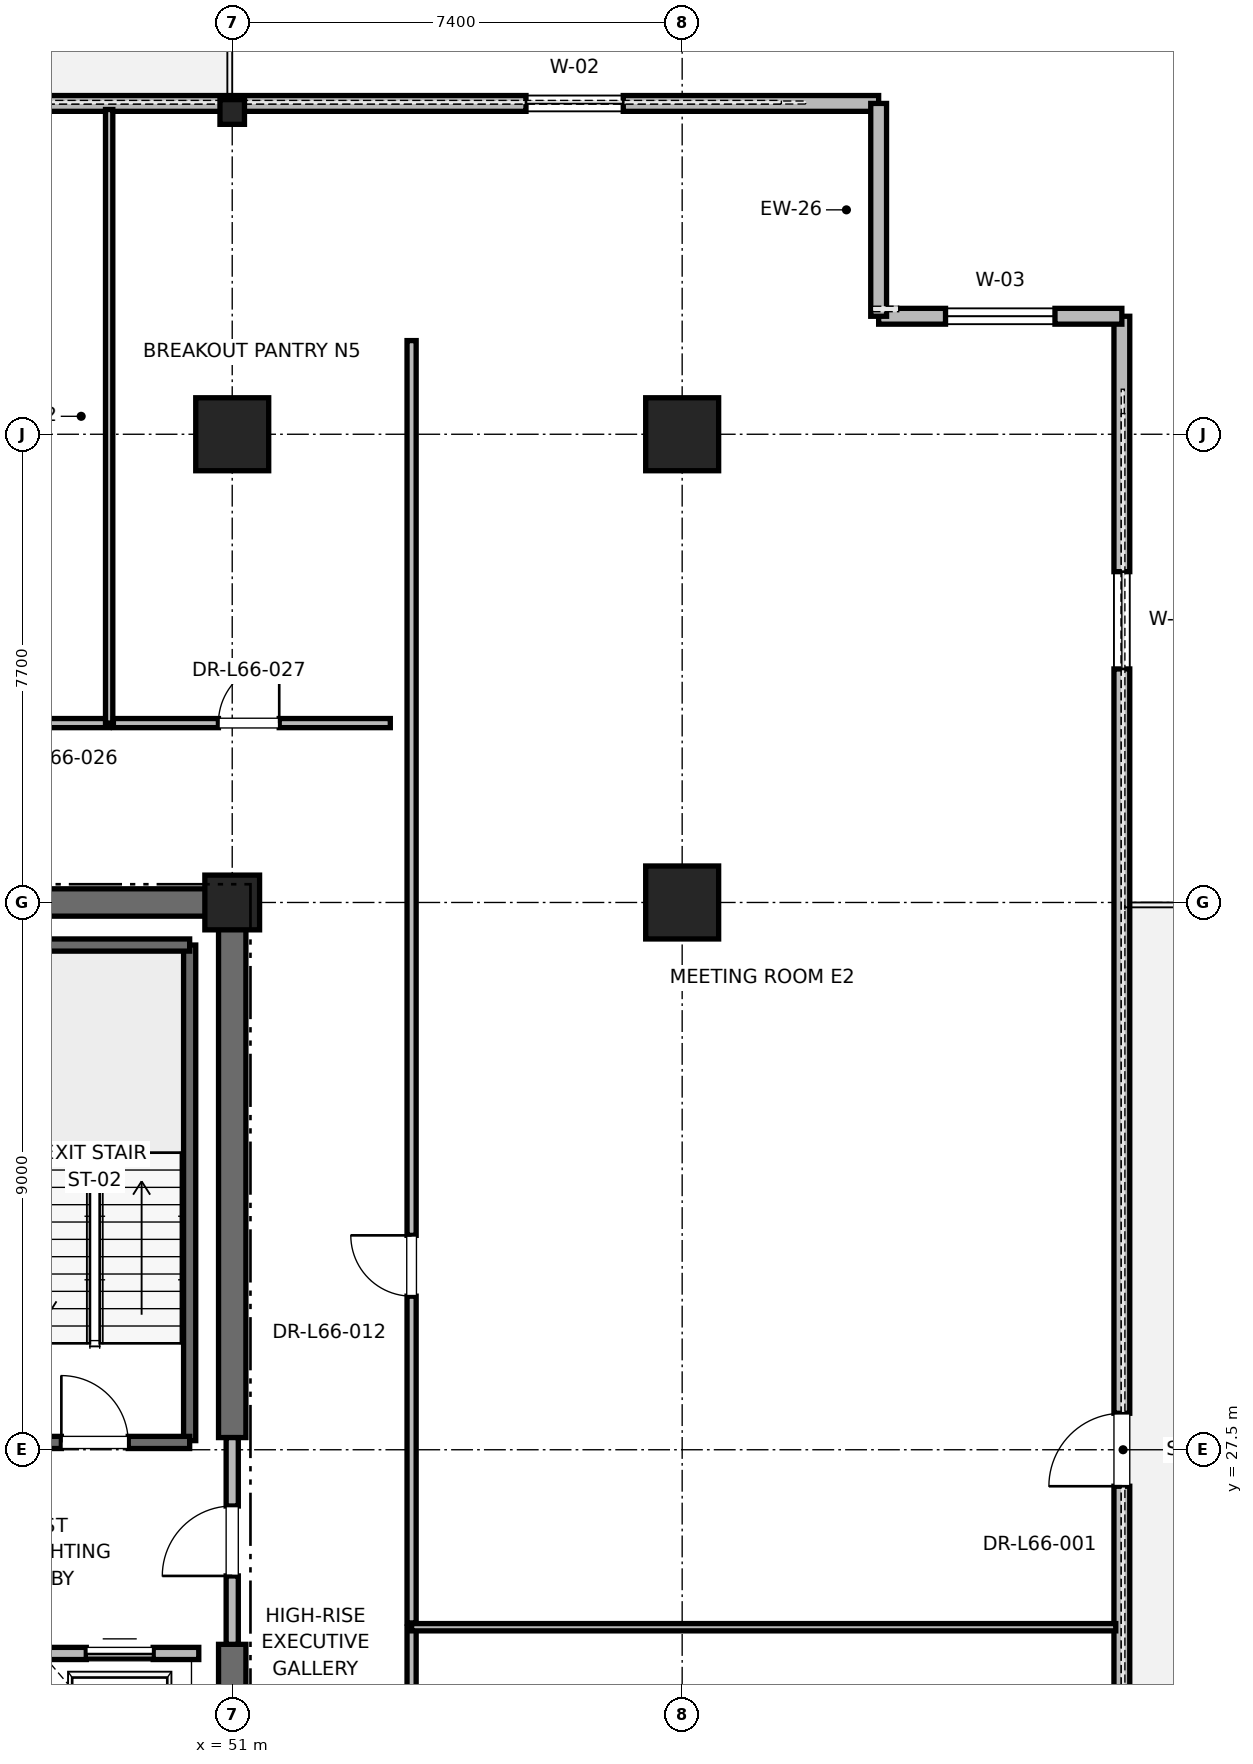
"""IFC4 building model, lengths in metres.
Left out: names, types, materials, properties, quantities, classifications, styles, units other than length and angle.
Written with IfcOpenShell. Run it as: python <this file> out.ifc"""

import sys

from ifc_helpers import new_model, si_unit, direction, frame, frame_2d, origin, origin_2d, place, context, subcontext, project, spatial, rectangle, i_section, extrude, element, fill, save


model = new_model("IFC4")
c1 = context("Model", 3, precision=1e-05, world=origin(), true_north=direction((0.0, 1.0)))
c2 = subcontext(c1, "Body", "Model", "MODEL_VIEW")
j1 = project(units=[si_unit("LENGTHUNIT", "METRE"), si_unit("PLANEANGLEUNIT", "RADIAN")], contexts=[c1])
p1 = place(None, origin())
s1 = spatial("IfcSite", under=j1, at=p1, CompositionType="ELEMENT")
p2 = place(p1, origin())
s2 = spatial("IfcBuilding", under=s1, at=p2, CompositionType="ELEMENT")
p3 = place(p2, frame((0.0, 0.0, 283.2)))
s3 = spatial("IfcBuildingStorey", under=s2, at=p3, CompositionType="ELEMENT", Elevation=283.2)
for number, where, z_axis, x_axis in (
    (1, (51.0, 44.2, 0.0), (0.0, 0.0, 1.0), (1.0, 0.0, 0.0)),
    (2, (58.4, 36.5, 0.0), (0.0, 0.0, 1.0), (1.0, 0.0, 0.0)),
    (3, (58.4, 44.2, 0.0), (0.0, 0.0, 1.0), (1.0, 0.0, 0.0)),
):
    element("IfcColumn", number, at=place(p3, frame(where, z_axis=z_axis, x_axis=x_axis)), inside=s3, PredefinedType="COLUMN", context=c2, shape_type="SweptSolid", body=[
        extrude(rectangle(XDim=1.2, YDim=1.2, at=origin_2d()), origin(), (0.0, 0.0, 1.0), 4.0),
    ])
p4 = place(p3, frame((51.0, 49.5, 0.0), z_axis=(0.0, 0.0, 1.0), x_axis=(1.0, 0.0, 0.0)))
e4 = element("IfcColumn", 4, at=p4, inside=s3, PredefinedType="COLUMN", context=c2, shape_type="SweptSolid", body=[
    extrude(i_section(OverallWidth=0.403, OverallDepth=0.406, WebThickness=0.027, FlangeThickness=0.043, FilletRadius=0.015, at=origin_2d()), origin(), (0.0, 0.0, 1.0), 4.0),
])
p5 = place(p3, frame((51.0, 36.5, 0.0), z_axis=(0.0, 0.0, 1.0), x_axis=(1.0, 0.0, 0.0)))
e5 = element("IfcColumn", 5, at=p5, inside=s3, PredefinedType="PILASTER", context=c2, shape_type="SweptSolid", body=[
    extrude(rectangle(XDim=0.9, YDim=0.9, at=origin_2d()), origin(), (0.0, 0.0, 1.0), 4.0),
])
for number, where, z_axis, x_axis in (
    (6, (45.2, 36.5, 0.0), (0.0, 0.0, 1.0), (1.0, 0.0, 0.0)),
    (7, (51.0, 18.5, 0.0), (0.0, 0.0, 1.0), (0.0, 1.0, 0.0)),
):
    element("IfcWall", number, at=place(p3, frame(where, z_axis=z_axis, x_axis=x_axis)), inside=s3, PredefinedType="SHEAR", context=c2, shape_type="SweptSolid", body=[
        extrude(rectangle(XDim=5.8, YDim=0.45, at=frame_2d((2.9, 0.0))), origin(), (0.0, 0.0, 1.0), 3.785),
    ])
p6 = place(p3, frame((51.0, 27.7, 0.0), z_axis=(0.0, 0.0, 1.0), x_axis=(0.0, 1.0, 0.0)))
e8 = element("IfcWall", 8, at=p6, inside=s3, PredefinedType="SHEAR", context=c2, shape_type="SweptSolid", body=[
    extrude(rectangle(XDim=8.8, YDim=0.45, at=frame_2d((4.4, 0.0))), origin(), (0.0, 0.0, 1.0), 3.785),
])
p7 = place(p3, frame((65.631, 8.86, 0.0), z_axis=(0.0, 0.0, 1.0), x_axis=(0.0, 1.0, 0.0)))
e9 = element("IfcWall", 9, at=p7, inside=s3, PredefinedType="PARAPET", context=c2, shape_type="SweptSolid", body=[
    extrude(rectangle(XDim=37.281, YDim=0.26, at=frame_2d((18.64, 0.0))), origin(), (0.0, 0.0, 1.0), 3.123),
])
p8 = place(p7, frame((4.2, 0.0, 0.85)))
e10 = element("IfcOpeningElement", 10, at=p8, cuts=e9, PredefinedType="OPENING", context=c2, shape_type="SweptSolid", body=[
    extrude(rectangle(XDim=1.6, YDim=2.1, at=frame_2d((0.8, 1.05))), frame((0.0, 0.13, 0.0), z_axis=(0.0, -1.0, 0.0), x_axis=(1.0, 0.0, 0.0)), (0.0, 0.0, 1.0), 0.26),
])
p9 = place(p7, frame((18.04, 0.0, 0.0)))
e11 = element("IfcOpeningElement", 11, at=p9, cuts=e9, PredefinedType="OPENING", context=c2, shape_type="SweptSolid", body=[
    extrude(rectangle(XDim=1.2, YDim=2.2, at=frame_2d((0.6, 1.1))), frame((0.0, 0.13, 0.0), z_axis=(0.0, -1.0, 0.0), x_axis=(1.0, 0.0, 0.0)), (0.0, 0.0, 1.0), 0.26),
])
p10 = place(p7, frame((31.481, 0.0, 0.85)))
e12 = element("IfcOpeningElement", 12, at=p10, cuts=e9, PredefinedType="OPENING", context=c2, shape_type="SweptSolid", body=[
    extrude(rectangle(XDim=1.6, YDim=2.1, at=frame_2d((0.8, 1.05))), frame((0.0, 0.13, 0.0), z_axis=(0.0, -1.0, 0.0), x_axis=(1.0, 0.0, 0.0)), (0.0, 0.0, 1.0), 0.26),
])
p11 = place(p3, frame((61.631, 49.64, 0.0), z_axis=(0.0, 0.0, 1.0), x_axis=(-1.0, 0.0, 0.0)))
e13 = element("IfcWall", 13, at=p11, inside=s3, PredefinedType="PARAPET", context=c2, shape_type="SweptSolid", body=[
    extrude(rectangle(XDim=43.263, YDim=0.26, at=frame_2d((21.631, 0.0))), origin(), (0.0, 0.0, 1.0), 3.123),
])
p12 = place(p11, frame((4.2, 0.0, 0.85)))
e14 = element("IfcOpeningElement", 14, at=p12, cuts=e13, PredefinedType="OPENING", context=c2, shape_type="SweptSolid", body=[
    extrude(rectangle(XDim=1.6, YDim=2.1, at=frame_2d((0.8, 1.05))), frame((0.0, 0.13, 0.0), z_axis=(0.0, -1.0, 0.0), x_axis=(1.0, 0.0, 0.0)), (0.0, 0.0, 1.0), 0.26),
])
p13 = place(p11, frame((21.031, 0.0, 0.0)))
e15 = element("IfcOpeningElement", 15, at=p13, cuts=e13, PredefinedType="OPENING", context=c2, shape_type="SweptSolid", body=[
    extrude(rectangle(XDim=1.2, YDim=2.2, at=frame_2d((0.6, 1.1))), frame((0.0, 0.13, 0.0), z_axis=(0.0, -1.0, 0.0), x_axis=(1.0, 0.0, 0.0)), (0.0, 0.0, 1.0), 0.26),
])
p14 = place(p11, frame((37.463, 0.0, 0.85)))
e16 = element("IfcOpeningElement", 16, at=p14, cuts=e13, PredefinedType="OPENING", context=c2, shape_type="SweptSolid", body=[
    extrude(rectangle(XDim=1.6, YDim=2.1, at=frame_2d((0.8, 1.05))), frame((0.0, 0.13, 0.0), z_axis=(0.0, -1.0, 0.0), x_axis=(1.0, 0.0, 0.0)), (0.0, 0.0, 1.0), 0.26),
])
p15 = place(p3, frame((65.631, 46.14, 0.0), z_axis=(0.0, 0.0, 1.0), x_axis=(-1.0, 0.0, 0.0)))
e17 = element("IfcWall", 17, at=p15, inside=s3, PredefinedType="PARAPET", context=c2, shape_type="SweptSolid", body=[
    extrude(rectangle(XDim=4.0, YDim=0.26, at=frame_2d((2.0, 0.0))), origin(), (0.0, 0.0, 1.0), 3.785),
])
p16 = place(p15, frame((1.1, 0.0, 0.85)))
e18 = element("IfcOpeningElement", 18, at=p16, cuts=e17, PredefinedType="OPENING", context=c2, shape_type="SweptSolid", body=[
    extrude(rectangle(XDim=1.8, YDim=2.2, at=frame_2d((0.9, 1.1))), frame((0.0, 0.13, 0.0), z_axis=(0.0, -1.0, 0.0), x_axis=(1.0, 0.0, 0.0)), (0.0, 0.0, 1.0), 0.26),
])
p17 = place(p3, frame((61.631, 46.14, 0.0), z_axis=(0.0, 0.0, 1.0), x_axis=(0.0, 1.0, 0.0)))
e19 = element("IfcWall", 19, at=p17, inside=s3, PredefinedType="PARAPET", context=c2, shape_type="SweptSolid", body=[
    extrude(rectangle(XDim=3.5, YDim=0.26, at=frame_2d((1.75, 0.0))), origin(), (0.0, 0.0, 1.0), 3.785),
])
p18 = place(p3, frame((50.3, 27.65, 0.0), z_axis=(0.0, 0.0, 1.0), x_axis=(0.0, 1.0, 0.0)))
e20 = element("IfcWall", 20, at=p18, inside=s3, PredefinedType="SOLIDWALL", context=c2, shape_type="SweptSolid", body=[
    extrude(rectangle(XDim=8.15, YDim=0.2, at=frame_2d((4.075, 0.0))), origin(), (0.0, 0.0, 1.0), 3.785),
])
p19 = place(p3, frame((47.18, 35.8, 0.0), z_axis=(0.0, 0.0, 1.0), x_axis=(1.0, 0.0, 0.0)))
e21 = element("IfcWall", 21, at=p19, inside=s3, PredefinedType="SOLIDWALL", context=c2, shape_type="SweptSolid", body=[
    extrude(rectangle(XDim=3.12, YDim=0.2, at=frame_2d((1.56, 0.0))), origin(), (0.0, 0.0, 1.0), 3.785),
])
p20 = place(p3, frame((47.18, 27.62, 0.0), z_axis=(0.0, 0.0, 1.0), x_axis=(1.0, 0.0, 0.0)))
e22 = element("IfcWall", 22, at=p20, inside=s3, PredefinedType="SOLIDWALL", context=c2, shape_type="SweptSolid", body=[
    extrude(rectangle(XDim=3.12, YDim=0.2, at=frame_2d((1.56, 0.0))), origin(), (0.0, 0.0, 1.0), 3.785),
])
p21 = place(p20, frame((1.01, 0.0, 0.0)))
e23 = element("IfcOpeningElement", 23, at=p21, cuts=e22, PredefinedType="OPENING", context=c2, shape_type="SweptSolid", body=[
    extrude(rectangle(XDim=1.1, YDim=2.15, at=frame_2d((0.55, 1.075))), frame((0.0, 0.1, 0.0), z_axis=(0.0, -1.0, 0.0), x_axis=(1.0, 0.0, 0.0)), (0.0, 0.0, 1.0), 0.2),
])
p22 = place(p3, frame((51.0, 24.3, 0.0), z_axis=(0.0, 0.0, 1.0), x_axis=(0.0, 1.0, 0.0)))
e24 = element("IfcWall", 24, at=p22, inside=s3, PredefinedType="PARTITIONING", context=c2, shape_type="SweptSolid", body=[
    extrude(rectangle(XDim=3.4, YDim=0.2, at=frame_2d((1.7, 0.0))), origin(), (0.0, 0.0, 1.0), 2.865),
])
p23 = place(p22, frame((1.125, 0.0, 0.0)))
e25 = element("IfcOpeningElement", 25, at=p23, cuts=e24, PredefinedType="OPENING", context=c2, shape_type="SweptSolid", body=[
    extrude(rectangle(XDim=1.15, YDim=2.2, at=frame_2d((0.575, 1.1))), frame((0.0, 0.1, 0.0), z_axis=(0.0, -1.0, 0.0), x_axis=(1.0, 0.0, 0.0)), (0.0, 0.0, 1.0), 0.2),
])
p24 = place(p3, frame((50.45, 24.15, 0.0), z_axis=(0.0, 0.0, 1.0), x_axis=(-1.0, 0.0, 0.0)))
e26 = element("IfcWall", 26, at=p24, inside=s3, PredefinedType="SOLIDWALL", context=c2, shape_type="SweptSolid", body=[
    extrude(rectangle(XDim=2.6, YDim=0.2, at=frame_2d((1.3, 0.0))), origin(), (0.0, 0.0, 1.0), 2.865),
])
p25 = place(p24, frame((0.75, 0.0, 0.0)))
e27 = element("IfcOpeningElement", 27, at=p25, cuts=e26, PredefinedType="OPENING", context=c2, shape_type="SweptSolid", body=[
    extrude(rectangle(XDim=1.1, YDim=2.2, at=frame_2d((0.55, 1.1))), frame((0.0, 0.1, 0.0), z_axis=(0.0, -1.0, 0.0), x_axis=(1.0, 0.0, 0.0)), (0.0, 0.0, 1.0), 0.2),
])
p26 = place(p3, frame((43.334, 39.45, 0.0), z_axis=(0.0, 0.0, 1.0), x_axis=(1.0, 0.0, 0.0)))
e28 = element("IfcWall", 28, at=p26, inside=s3, PredefinedType="PARTITIONING", context=c2, shape_type="SweptSolid", body=[
    extrude(rectangle(XDim=5.642, YDim=0.15, at=frame_2d((2.821, 0.0))), origin(), (0.0, 0.0, 1.0), 2.85),
])
p27 = place(p26, frame((2.286, 0.0, 0.0)))
e29 = element("IfcOpeningElement", 29, at=p27, cuts=e28, PredefinedType="OPENING", context=c2, shape_type="SweptSolid", body=[
    extrude(rectangle(XDim=1.0, YDim=2.15, at=frame_2d((0.5, 1.075))), frame((0.0, 0.075, 0.0), z_axis=(0.0, -1.0, 0.0), x_axis=(1.0, 0.0, 0.0)), (0.0, 0.0, 1.0), 0.15),
])
p28 = place(p3, frame((48.976, 39.45, 0.0), z_axis=(0.0, 0.0, 1.0), x_axis=(0.0, 1.0, 0.0)))
e30 = element("IfcWall", 30, at=p28, inside=s3, PredefinedType="PARTITIONING", context=c2, shape_type="SweptSolid", body=[
    extrude(rectangle(XDim=10.09, YDim=0.12, at=frame_2d((5.045, 0.0))), origin(), (0.0, 0.0, 1.0), 2.415),
])
p29 = place(p3, frame((49.046, 39.45, 0.0), z_axis=(0.0, 0.0, 1.0), x_axis=(1.0, 0.0, 0.0)))
e31 = element("IfcWall", 31, at=p29, inside=s3, PredefinedType="PARTITIONING", context=c2, shape_type="SweptSolid", body=[
    extrude(rectangle(XDim=4.554, YDim=0.15, at=frame_2d((2.277, 0.0))), origin(), (0.0, 0.0, 1.0), 2.85),
])
p30 = place(p29, frame((1.727, 0.0, 0.0)))
e32 = element("IfcOpeningElement", 32, at=p30, cuts=e31, PredefinedType="OPENING", context=c2, shape_type="SweptSolid", body=[
    extrude(rectangle(XDim=1.0, YDim=2.15, at=frame_2d((0.5, 1.075))), frame((0.0, 0.075, 0.0), z_axis=(0.0, -1.0, 0.0), x_axis=(1.0, 0.0, 0.0)), (0.0, 0.0, 1.0), 0.15),
])
p31 = place(p3, frame((53.95, 9.26, 0.0), z_axis=(0.0, 0.0, 1.0), x_axis=(0.0, 1.0, 0.0)))
e33 = element("IfcWall", 33, at=p31, inside=s3, PredefinedType="PARTITIONING", context=c2, shape_type="SweptSolid", body=[
    extrude(rectangle(XDim=15.322, YDim=0.15, at=frame_2d((7.661, 0.0))), origin(), (0.0, 0.0, 1.0), 2.85),
])
p32 = place(p31, frame((11.546, 0.0, 0.0)))
e34 = element("IfcOpeningElement", 34, at=p32, cuts=e33, PredefinedType="OPENING", context=c2, shape_type="SweptSolid", body=[
    extrude(rectangle(XDim=1.5, YDim=2.25, at=frame_2d((0.75, 1.125))), frame((0.0, 0.075, 0.0), z_axis=(0.0, -1.0, 0.0), x_axis=(1.0, 0.0, 0.0)), (0.0, 0.0, 1.0), 0.15),
])
p33 = place(p3, frame((53.95, 24.582, 0.0), z_axis=(0.0, 0.0, 1.0), x_axis=(1.0, 0.0, 0.0)))
e35 = element("IfcWall", 35, at=p33, inside=s3, PredefinedType="PARTITIONING", context=c2, shape_type="SweptSolid", body=[
    extrude(rectangle(XDim=11.581, YDim=0.12, at=frame_2d((5.791, 0.0))), origin(), (0.0, 0.0, 1.0), 2.85),
])
p34 = place(p3, frame((53.95, 24.652, 0.0), z_axis=(0.0, 0.0, 1.0), x_axis=(0.0, 1.0, 0.0)))
e36 = element("IfcWall", 36, at=p34, inside=s3, PredefinedType="PARTITIONING", context=c2, shape_type="SweptSolid", body=[
    extrude(rectangle(XDim=21.089, YDim=0.15, at=frame_2d((10.544, 0.0))), origin(), (0.0, 0.0, 1.0), 2.85),
])
p35 = place(p34, frame((5.374, 0.0, 0.0)))
e37 = element("IfcOpeningElement", 37, at=p35, cuts=e36, PredefinedType="OPENING", context=c2, shape_type="SweptSolid", body=[
    extrude(rectangle(XDim=1.0, YDim=2.15, at=frame_2d((0.5, 1.075))), frame((0.0, 0.075, 0.0), z_axis=(0.0, -1.0, 0.0), x_axis=(1.0, 0.0, 0.0)), (0.0, 0.0, 1.0), 0.15),
])
p36 = place(p9, origin())
e38 = element("IfcDoor", 38, at=p36, inside=s3, OperationType="SINGLE_SWING_LEFT", PredefinedType="DOOR", context=c2, shape_type="SweptSolid", body=[
    extrude(rectangle(XDim=1.2, YDim=2.2, at=frame_2d((0.6, 1.1))), frame((0.0, 0.025, 0.0), z_axis=(0.0, -1.0, 0.0), x_axis=(1.0, 0.0, 0.0)), (0.0, 0.0, 1.0), 0.05),
])
fill(e11, e38)
p37 = place(p10, origin())
e39 = element("IfcWindow", 39, at=p37, inside=s3, PartitioningType="SINGLE_PANEL", PredefinedType="WINDOW", context=c2, shape_type="SweptSolid", body=[
    extrude(rectangle(XDim=1.6, YDim=2.1, at=frame_2d((0.8, 1.05))), frame((0.0, 0.03, 0.0), z_axis=(0.0, -1.0, 0.0), x_axis=(1.0, 0.0, 0.0)), (0.0, 0.0, 1.0), 0.06),
])
fill(e12, e39)
p38 = place(p12, origin())
e40 = element("IfcWindow", 40, at=p38, inside=s3, PartitioningType="SINGLE_PANEL", PredefinedType="WINDOW", context=c2, shape_type="SweptSolid", body=[
    extrude(rectangle(XDim=1.6, YDim=2.1, at=frame_2d((0.8, 1.05))), frame((0.0, 0.03, 0.0), z_axis=(0.0, -1.0, 0.0), x_axis=(1.0, 0.0, 0.0)), (0.0, 0.0, 1.0), 0.06),
])
fill(e14, e40)
p39 = place(p16, origin())
e41 = element("IfcWindow", 41, at=p39, inside=s3, PartitioningType="SINGLE_PANEL", PredefinedType="WINDOW", context=c2, shape_type="SweptSolid", body=[
    extrude(rectangle(XDim=1.8, YDim=2.2, at=frame_2d((0.9, 1.1))), frame((0.0, 0.03, 0.0), z_axis=(0.0, -1.0, 0.0), x_axis=(1.0, 0.0, 0.0)), (0.0, 0.0, 1.0), 0.06),
])
fill(e18, e41)
p40 = place(p21, origin())
e42 = element("IfcDoor", 42, at=p40, inside=s3, OperationType="SINGLE_SWING_LEFT", PredefinedType="DOOR", context=c2, shape_type="SweptSolid", body=[
    extrude(rectangle(XDim=1.1, YDim=2.15, at=frame_2d((0.55, 1.075))), frame((0.0, 0.025, 0.0), z_axis=(0.0, -1.0, 0.0), x_axis=(1.0, 0.0, 0.0)), (0.0, 0.0, 1.0), 0.05),
])
fill(e23, e42)
p41 = place(p23, origin())
e43 = element("IfcDoor", 43, at=p41, inside=s3, OperationType="SINGLE_SWING_LEFT", PredefinedType="DOOR", context=c2, shape_type="SweptSolid", body=[
    extrude(rectangle(XDim=1.15, YDim=2.2, at=frame_2d((0.575, 1.1))), frame((0.0, 0.025, 0.0), z_axis=(0.0, -1.0, 0.0), x_axis=(1.0, 0.0, 0.0)), (0.0, 0.0, 1.0), 0.05),
])
fill(e25, e43)
p42 = place(p25, origin())
e44 = element("IfcDoor", 44, at=p42, inside=s3, OperationType="SLIDING_TO_RIGHT", PredefinedType="DOOR", context=c2, shape_type="SweptSolid", body=[
    extrude(rectangle(XDim=1.1, YDim=2.2, at=frame_2d((0.55, 1.1))), frame((0.0, 0.025, 0.0), z_axis=(0.0, -1.0, 0.0), x_axis=(1.0, 0.0, 0.0)), (0.0, 0.0, 1.0), 0.05),
])
fill(e27, e44)
p43 = place(p30, origin())
e45 = element("IfcDoor", 45, at=p43, inside=s3, OperationType="SINGLE_SWING_RIGHT", PredefinedType="DOOR", context=c2, shape_type="SweptSolid", body=[
    extrude(rectangle(XDim=1.0, YDim=2.15, at=frame_2d((0.5, 1.075))), frame((0.0, 0.025, 0.0), z_axis=(0.0, -1.0, 0.0), x_axis=(1.0, 0.0, 0.0)), (0.0, 0.0, 1.0), 0.05),
])
fill(e32, e45)
p44 = place(p35, origin())
e46 = element("IfcDoor", 46, at=p44, inside=s3, OperationType="SINGLE_SWING_RIGHT", PredefinedType="DOOR", context=c2, shape_type="SweptSolid", body=[
    extrude(rectangle(XDim=1.0, YDim=2.15, at=frame_2d((0.5, 1.075))), frame((0.0, 0.025, 0.0), z_axis=(0.0, -1.0, 0.0), x_axis=(1.0, 0.0, 0.0)), (0.0, 0.0, 1.0), 0.05),
])
fill(e37, e46)
save(model, sys.argv[1])
